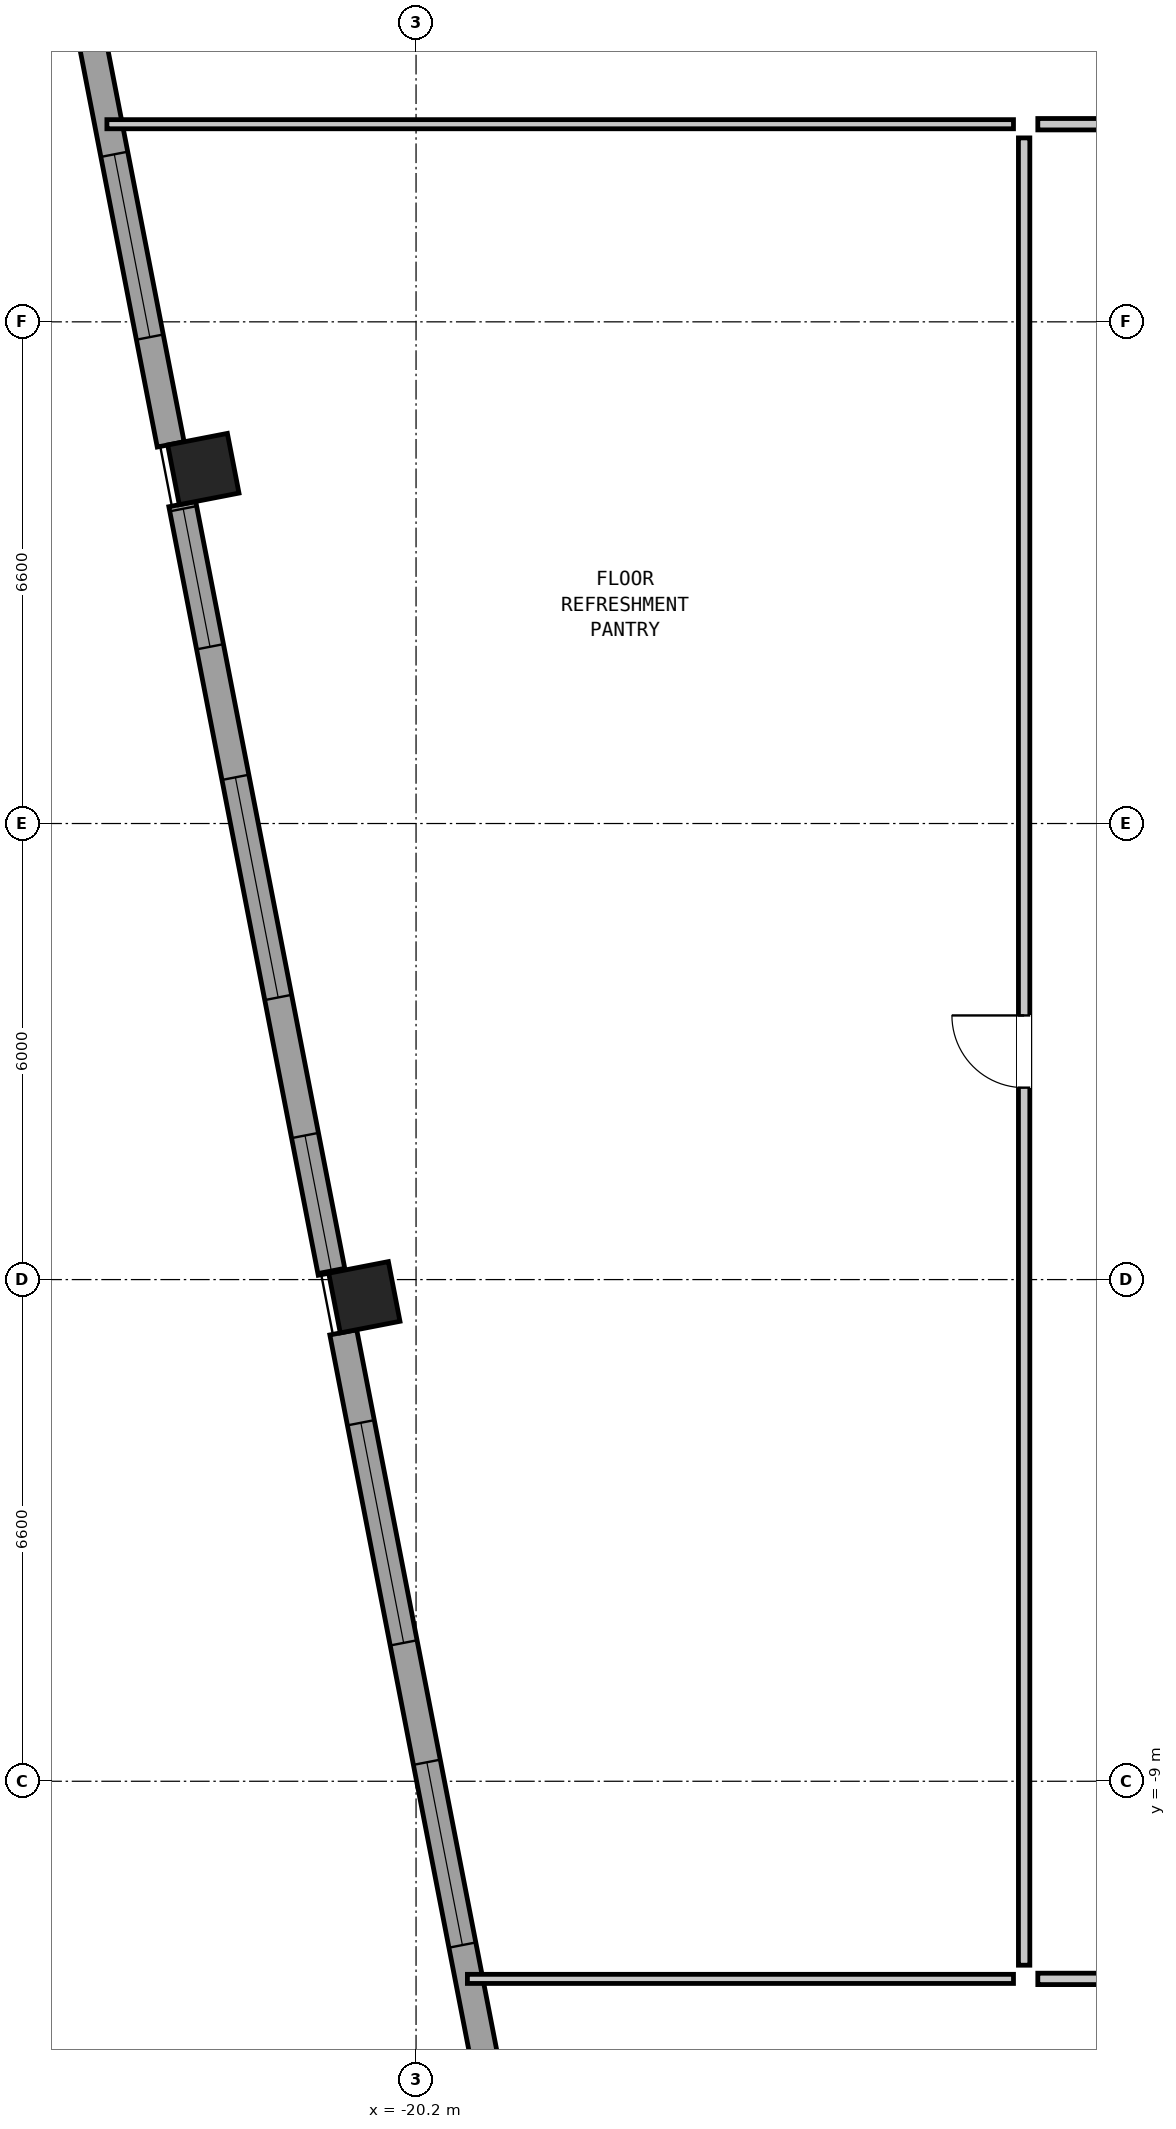
"""IFC4 building model, lengths in metres.
Left out: names, types, materials, properties, quantities, classifications, styles, units other than length and angle.
Written with IfcOpenShell. Run it as: python <this file> out.ifc"""

import sys

from ifc_helpers import new_model, si_unit, direction, frame, frame_2d, origin, origin_2d, place, context, subcontext, project, spatial, rectangle, hollow_rectangle, extrude, element, fill, save


model = new_model("IFC4")
c1 = context("Model", 3, precision=1e-05, world=origin(), true_north=direction((0.0, 1.0)))
c2 = subcontext(c1, "Body", "Model", "MODEL_VIEW")
j1 = project(units=[si_unit("LENGTHUNIT", "METRE"), si_unit("PLANEANGLEUNIT", "RADIAN")], contexts=[c1])
p1 = place(None, origin())
s1 = spatial("IfcSite", under=j1, at=p1, CompositionType="ELEMENT")
p2 = place(p1, origin())
s2 = spatial("IfcBuilding", under=s1, at=p2, CompositionType="ELEMENT")
p3 = place(p2, frame((0.0, 0.0, 115.85)))
s3 = spatial("IfcBuildingStorey", under=s2, at=p3, CompositionType="ELEMENT", Elevation=115.85)
for number, where, z_axis, x_axis in (
    (1, (-22.998, 8.263, 0.0), (0.0, 0.0, 1.0), (-0.191, 0.982, 0.0)),
    (2, (-20.88, -2.633, 0.0), (0.0, 0.0, 1.0), (-0.191, 0.982, 0.0)),
):
    element("IfcColumn", number, at=place(p3, frame(where, z_axis=z_axis, x_axis=x_axis)), inside=s3, PredefinedType="COLUMN", context=c2, shape_type="SweptSolid", body=[
        extrude(hollow_rectangle(XDim=0.8, YDim=0.8, WallThickness=0.05, at=origin_2d()), origin(), (0.0, 0.0, 1.0), 3.05),
    ])
p4 = place(p3, frame((-19.19, -13.217, 0.0), z_axis=(0.0, 0.0, 1.0), x_axis=(-0.190822765986, 0.981624506612, 0.0)))
e3 = element("IfcWall", 3, at=p4, inside=s3, PredefinedType="SOLIDWALL", context=c2, shape_type="SweptSolid", body=[
    extrude(rectangle(XDim=10.312, YDim=0.36, at=frame_2d((5.156, 0.0))), origin(), (0.0, 0.0, 1.0), 2.067),
])
p5 = place(p4, frame((2.1, 0.0, 0.2)))
e4 = element("IfcOpeningElement", 4, at=p5, cuts=e3, PredefinedType="OPENING", context=c2, shape_type="SweptSolid", body=[
    extrude(rectangle(XDim=2.45, YDim=1.1, at=frame_2d((1.225, 0.55))), frame((0.0, 0.192, 0.0), z_axis=(0.0, -1.0, 0.0), x_axis=(1.0, 0.0, 0.0)), (0.0, 0.0, 1.0), 0.384),
])
p6 = place(p4, frame((6.15, 0.0, 0.95)))
e5 = element("IfcOpeningElement", 5, at=p6, cuts=e3, PredefinedType="OPENING", context=c2, shape_type="SweptSolid", body=[
    extrude(rectangle(XDim=2.95, YDim=0.95, at=frame_2d((1.475, 0.475))), frame((0.0, 0.192, 0.0), z_axis=(0.0, -1.0, 0.0), x_axis=(1.0, 0.0, 0.0)), (0.0, 0.0, 1.0), 0.384),
])
p7 = place(p3, frame((-21.31, -2.309, 0.0), z_axis=(0.0, 0.0, 1.0), x_axis=(-0.190811924826, 0.981626614016, 0.0)))
e6 = element("IfcWall", 6, at=p7, inside=s3, PredefinedType="SOLIDWALL", context=c2, shape_type="SweptSolid", body=[
    extrude(rectangle(XDim=10.3, YDim=0.36, at=frame_2d((5.15, 0.0))), origin(), (0.0, 0.0, 1.0), 2.067),
])
p8 = place(p7, frame((0.038, 0.0, 0.2)))
e7 = element("IfcOpeningElement", 7, at=p8, cuts=e6, PredefinedType="OPENING", context=c2, shape_type="SweptSolid", body=[
    extrude(rectangle(XDim=1.8, YDim=1.25, at=frame_2d((0.9, 0.625))), frame((0.0, 0.192, 0.0), z_axis=(0.0, -1.0, 0.0), x_axis=(1.0, 0.0, 0.0)), (0.0, 0.0, 1.0), 0.384),
])
p9 = place(p7, frame((3.688, 0.0, 0.95)))
e8 = element("IfcOpeningElement", 8, at=p9, cuts=e6, PredefinedType="OPENING", context=c2, shape_type="SweptSolid", body=[
    extrude(rectangle(XDim=2.95, YDim=0.95, at=frame_2d((1.475, 0.475))), frame((0.0, 0.192, 0.0), z_axis=(0.0, -1.0, 0.0), x_axis=(1.0, 0.0, 0.0)), (0.0, 0.0, 1.0), 0.384),
])
p10 = place(p7, frame((8.388, 0.0, 0.2)))
e9 = element("IfcOpeningElement", 9, at=p10, cuts=e6, PredefinedType="OPENING", context=c2, shape_type="SweptSolid", body=[
    extrude(rectangle(XDim=1.85, YDim=1.2, at=frame_2d((0.925, 0.6))), frame((0.0, 0.192, 0.0), z_axis=(0.0, -1.0, 0.0), x_axis=(1.0, 0.0, 0.0)), (0.0, 0.0, 1.0), 0.384),
])
p11 = place(p3, frame((-23.428, 8.587, 0.0), z_axis=(0.0, 0.0, 1.0), x_axis=(-0.190822765986, 0.981624506612, 0.0)))
e10 = element("IfcWall", 10, at=p11, inside=s3, PredefinedType="SOLIDWALL", context=c2, shape_type="SweptSolid", body=[
    extrude(rectangle(XDim=10.312, YDim=0.36, at=frame_2d((5.156, 0.0))), origin(), (0.0, 0.0, 1.0), 2.067),
])
p12 = place(p11, frame((1.438, 0.0, 0.8)))
e11 = element("IfcOpeningElement", 11, at=p12, cuts=e10, PredefinedType="OPENING", context=c2, shape_type="SweptSolid", body=[
    extrude(rectangle(XDim=2.45, YDim=1.1, at=frame_2d((1.225, 0.55))), frame((0.0, 0.192, 0.0), z_axis=(0.0, -1.0, 0.0), x_axis=(1.0, 0.0, 0.0)), (0.0, 0.0, 1.0), 0.384),
])
p13 = place(p11, frame((5.438, 0.0, 0.2)))
e12 = element("IfcOpeningElement", 12, at=p13, cuts=e10, PredefinedType="OPENING", context=c2, shape_type="SweptSolid", body=[
    extrude(rectangle(XDim=3.1, YDim=0.9, at=frame_2d((1.55, 0.45))), frame((0.0, 0.192, 0.0), z_axis=(0.0, -1.0, 0.0), x_axis=(1.0, 0.0, 0.0)), (0.0, 0.0, 1.0), 0.384),
])
p14 = place(p3, frame((-24.267, 12.8, 0.0), z_axis=(0.0, 0.0, 1.0), x_axis=(1.0, 0.0, 0.0)))
e13 = element("IfcWall", 13, at=p14, inside=s3, PredefinedType="PARTITIONING", context=c2, shape_type="SweptSolid", body=[
    extrude(rectangle(XDim=11.927, YDim=0.12, at=frame_2d((5.964, 0.0))), origin(), (0.0, 0.0, 1.0), 2.83),
])
p15 = place(p3, frame((-19.524, -11.6, 0.0), z_axis=(0.0, 0.0, 1.0), x_axis=(1.0, 0.0, 0.0)))
e14 = element("IfcWall", 14, at=p15, inside=s3, PredefinedType="PARTITIONING", context=c2, shape_type="SweptSolid", body=[
    extrude(rectangle(XDim=7.184, YDim=0.12, at=frame_2d((3.592, 0.0))), origin(), (0.0, 0.0, 1.0), 2.347),
])
p16 = place(p3, frame((-12.02, 12.8, 0.0), z_axis=(0.0, 0.0, 1.0), x_axis=(1.0, 0.0, 0.0)))
e15 = element("IfcWall", 15, at=p16, inside=s3, PredefinedType="PARTITIONING", context=c2, shape_type="SweptSolid", body=[
    extrude(rectangle(XDim=9.54, YDim=0.15, at=frame_2d((4.77, 0.0))), origin(), (0.0, 0.0, 1.0), 2.83),
])
p17 = place(p16, frame((4.295, 0.0, 0.0)))
e16 = element("IfcOpeningElement", 16, at=p17, cuts=e15, PredefinedType="OPENING", context=c2, shape_type="SweptSolid", body=[
    extrude(rectangle(XDim=0.95, YDim=2.1, at=frame_2d((0.475, 1.05))), frame((0.0, 0.087, 0.0), z_axis=(0.0, -1.0, 0.0), x_axis=(1.0, 0.0, 0.0)), (0.0, 0.0, 1.0), 0.174),
])
p18 = place(p3, frame((-12.02, -11.6, 0.0), z_axis=(0.0, 0.0, 1.0), x_axis=(1.0, 0.0, 0.0)))
e17 = element("IfcWall", 17, at=p18, inside=s3, PredefinedType="PARTITIONING", context=c2, shape_type="SweptSolid", body=[
    extrude(rectangle(XDim=24.04, YDim=0.15, at=frame_2d((12.02, 0.0))), origin(), (0.0, 0.0, 1.0), 2.347),
])
p19 = place(p18, frame((11.545, 0.0, 0.0)))
e18 = element("IfcOpeningElement", 18, at=p19, cuts=e17, PredefinedType="OPENING", context=c2, shape_type="SweptSolid", body=[
    extrude(rectangle(XDim=0.95, YDim=2.1, at=frame_2d((0.475, 1.05))), frame((0.0, 0.087, 0.0), z_axis=(0.0, -1.0, 0.0), x_axis=(1.0, 0.0, 0.0)), (0.0, 0.0, 1.0), 0.174),
])
p20 = place(p3, frame((-12.2, -11.42, 0.0), z_axis=(0.0, 0.0, 1.0), x_axis=(0.0, 1.0, 0.0)))
e19 = element("IfcWall", 19, at=p20, inside=s3, PredefinedType="PARTITIONING", context=c2, shape_type="SweptSolid", body=[
    extrude(rectangle(XDim=24.04, YDim=0.15, at=frame_2d((12.02, 0.0))), origin(), (0.0, 0.0, 1.0), 2.83),
])
p21 = place(p20, frame((11.545, 0.0, 0.0)))
e20 = element("IfcOpeningElement", 20, at=p21, cuts=e19, PredefinedType="OPENING", context=c2, shape_type="SweptSolid", body=[
    extrude(rectangle(XDim=0.95, YDim=2.1, at=frame_2d((0.475, 1.05))), frame((0.0, 0.087, 0.0), z_axis=(0.0, -1.0, 0.0), x_axis=(1.0, 0.0, 0.0)), (0.0, 0.0, 1.0), 0.174),
])
p22 = place(p5, origin())
e21 = element("IfcWindow", 21, at=p22, inside=s3, PartitioningType="SINGLE_PANEL", PredefinedType="WINDOW", context=c2, shape_type="SweptSolid", body=[
    extrude(rectangle(XDim=2.45, YDim=1.1, at=frame_2d((1.225, 0.55))), frame((0.0, 0.03, 0.0), z_axis=(0.0, -1.0, 0.0), x_axis=(1.0, 0.0, 0.0)), (0.0, 0.0, 1.0), 0.06),
])
fill(e4, e21)
p23 = place(p6, origin())
e22 = element("IfcWindow", 22, at=p23, inside=s3, PartitioningType="SINGLE_PANEL", PredefinedType="WINDOW", context=c2, shape_type="SweptSolid", body=[
    extrude(rectangle(XDim=2.95, YDim=0.95, at=frame_2d((1.475, 0.475))), frame((0.0, 0.03, 0.0), z_axis=(0.0, -1.0, 0.0), x_axis=(1.0, 0.0, 0.0)), (0.0, 0.0, 1.0), 0.06),
])
fill(e5, e22)
p24 = place(p8, origin())
e23 = element("IfcWindow", 23, at=p24, inside=s3, PartitioningType="SINGLE_PANEL", PredefinedType="WINDOW", context=c2, shape_type="SweptSolid", body=[
    extrude(rectangle(XDim=1.8, YDim=1.25, at=frame_2d((0.9, 0.625))), frame((0.0, 0.03, 0.0), z_axis=(0.0, -1.0, 0.0), x_axis=(1.0, 0.0, 0.0)), (0.0, 0.0, 1.0), 0.06),
])
fill(e7, e23)
p25 = place(p9, origin())
e24 = element("IfcWindow", 24, at=p25, inside=s3, PartitioningType="SINGLE_PANEL", PredefinedType="WINDOW", context=c2, shape_type="SweptSolid", body=[
    extrude(rectangle(XDim=2.95, YDim=0.95, at=frame_2d((1.475, 0.475))), frame((0.0, 0.03, 0.0), z_axis=(0.0, -1.0, 0.0), x_axis=(1.0, 0.0, 0.0)), (0.0, 0.0, 1.0), 0.06),
])
fill(e8, e24)
p26 = place(p10, origin())
e25 = element("IfcWindow", 25, at=p26, inside=s3, PartitioningType="SINGLE_PANEL", PredefinedType="WINDOW", context=c2, shape_type="SweptSolid", body=[
    extrude(rectangle(XDim=1.85, YDim=1.2, at=frame_2d((0.925, 0.6))), frame((0.0, 0.03, 0.0), z_axis=(0.0, -1.0, 0.0), x_axis=(1.0, 0.0, 0.0)), (0.0, 0.0, 1.0), 0.06),
])
fill(e9, e25)
p27 = place(p12, origin())
e26 = element("IfcWindow", 26, at=p27, inside=s3, PartitioningType="SINGLE_PANEL", PredefinedType="WINDOW", context=c2, shape_type="SweptSolid", body=[
    extrude(rectangle(XDim=2.45, YDim=1.1, at=frame_2d((1.225, 0.55))), frame((0.0, 0.03, 0.0), z_axis=(0.0, -1.0, 0.0), x_axis=(1.0, 0.0, 0.0)), (0.0, 0.0, 1.0), 0.06),
])
fill(e11, e26)
p28 = place(p21, origin())
e27 = element("IfcDoor", 27, at=p28, inside=s3, OperationType="SINGLE_SWING_RIGHT", PredefinedType="DOOR", context=c2, shape_type="SweptSolid", body=[
    extrude(rectangle(XDim=0.95, YDim=2.1, at=frame_2d((0.475, 1.05))), frame((0.0, 0.025, 0.0), z_axis=(0.0, -1.0, 0.0), x_axis=(1.0, 0.0, 0.0)), (0.0, 0.0, 1.0), 0.05),
])
fill(e20, e27)
save(model, sys.argv[1])
